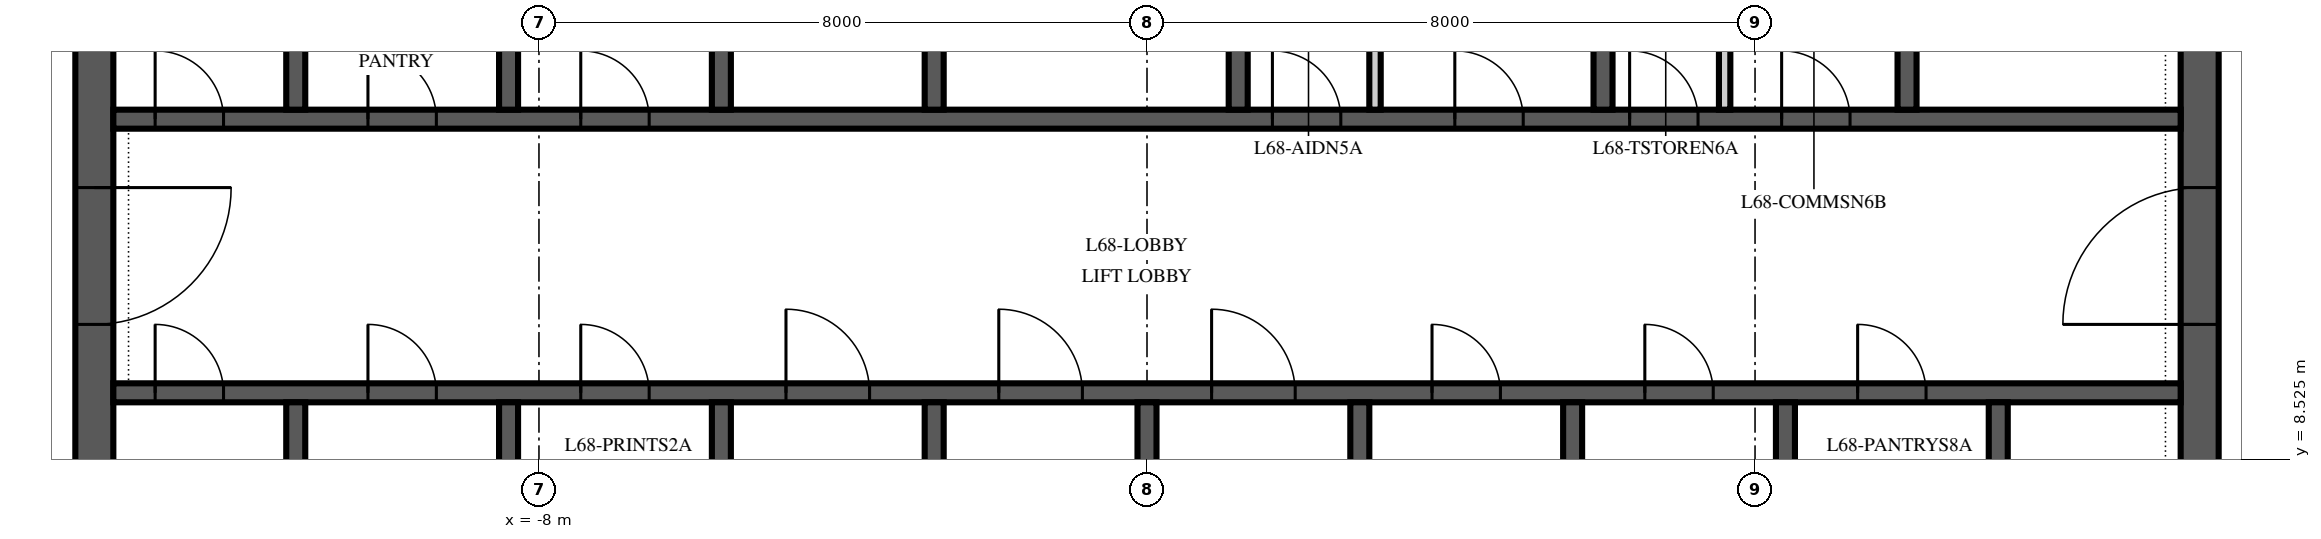
"""IFC4 building model, lengths in metres.
Left out: names, types, materials, properties, quantities, classifications, styles, units other than length and angle.
Written with IfcOpenShell. Run it as: python <this file> out.ifc"""

import sys

from ifc_helpers import new_model, si_unit, direction, frame, frame_2d, origin, place, context, subcontext, project, spatial, polyline, rectangle, outline, extrude, element, fill, save


model = new_model("IFC4")
c1 = context("Model", 3, precision=1e-05, world=origin(), true_north=direction((0.0, 1.0)))
c2 = subcontext(c1, "Body", "Model", "MODEL_VIEW")
j1 = project(units=[si_unit("LENGTHUNIT", "METRE"), si_unit("PLANEANGLEUNIT", "RADIAN")], contexts=[c1])
p1 = place(None, origin())
s1 = spatial("IfcSite", under=j1, at=p1, CompositionType="ELEMENT")
p2 = place(p1, origin())
s2 = spatial("IfcBuilding", under=s1, at=p2, CompositionType="ELEMENT")
p3 = place(p2, frame((0.0, 0.0, 292.0)))
s3 = spatial("IfcBuildingStorey", under=s2, at=p3, CompositionType="ELEMENT", Elevation=292.0)
p4 = place(p3, frame((13.85, 6.15, 0.0), z_axis=(0.0, 0.0, 1.0), x_axis=(0.0, 1.0, 0.0)))
e1 = element("IfcWall", 1, at=p4, inside=s3, PredefinedType="SHEAR", context=c2, shape_type="SweptSolid", body=[
    extrude(outline(polyline([(0.0, -0.25), (17.7, -0.25), (17.7, 0.0), (17.45, 0.0), (17.45, 0.25), (0.25, 0.25), (0.25, 0.0), (0.0, 0.0), (0.0, -0.25)])), origin(), (0.0, 0.0, 1.0), 4.0),
])
p5 = place(p4, frame((4.15, 0.0, 0.0)))
e2 = element("IfcOpeningElement", 2, at=p5, cuts=e1, PredefinedType="OPENING", context=c2, shape_type="SweptSolid", body=[
    extrude(rectangle(XDim=1.8, YDim=2.4, at=frame_2d((0.9, 1.2))), frame((0.0, 0.265, 0.0), z_axis=(0.0, -1.0, 0.0), x_axis=(1.0, 0.0, 0.0)), (0.0, 0.0, 1.0), 0.53),
])
p6 = place(p3, frame((-13.85, 23.85, 0.0), z_axis=(0.0, 0.0, 1.0), x_axis=(0.0, -1.0, 0.0)))
e3 = element("IfcWall", 3, at=p6, inside=s3, PredefinedType="SHEAR", context=c2, shape_type="SweptSolid", body=[
    extrude(outline(polyline([(0.0, -0.25), (17.7, -0.25), (17.7, 0.0), (17.45, 0.0), (17.45, 0.25), (0.25, 0.25), (0.25, 0.0), (0.0, 0.0), (0.0, -0.25)])), origin(), (0.0, 0.0, 1.0), 4.0),
])
p7 = place(p6, frame((11.75, 0.0, 0.0)))
e4 = element("IfcOpeningElement", 4, at=p7, cuts=e3, PredefinedType="OPENING", context=c2, shape_type="SweptSolid", body=[
    extrude(rectangle(XDim=1.8, YDim=2.4, at=frame_2d((0.9, 1.2))), frame((0.0, 0.265, 0.0), z_axis=(0.0, -1.0, 0.0), x_axis=(1.0, 0.0, 0.0)), (0.0, 0.0, 1.0), 0.53),
])
p8 = place(p3, frame((-13.6, 9.4, 0.0), z_axis=(0.0, 0.0, 1.0), x_axis=(1.0, 0.0, 0.0)))
e5 = element("IfcWall", 5, at=p8, inside=s3, PredefinedType="SHEAR", context=c2, shape_type="SweptSolid", body=[
    extrude(rectangle(XDim=27.2, YDim=0.25, at=frame_2d((13.6, 0.0))), origin(), (0.0, 0.0, 1.0), 4.0),
])
p9 = place(p8, frame((8.85, 0.0, 0.0)))
e6 = element("IfcOpeningElement", 6, at=p9, cuts=e5, PredefinedType="OPENING", context=c2, shape_type="SweptSolid", body=[
    extrude(rectangle(XDim=1.1, YDim=2.1, at=frame_2d((0.55, 1.05))), frame((0.0, 0.14, 0.0), z_axis=(0.0, -1.0, 0.0), x_axis=(1.0, 0.0, 0.0)), (0.0, 0.0, 1.0), 0.28),
])
p10 = place(p8, frame((11.65, 0.0, 0.0)))
e7 = element("IfcOpeningElement", 7, at=p10, cuts=e5, PredefinedType="OPENING", context=c2, shape_type="SweptSolid", body=[
    extrude(rectangle(XDim=1.1, YDim=2.1, at=frame_2d((0.55, 1.05))), frame((0.0, 0.14, 0.0), z_axis=(0.0, -1.0, 0.0), x_axis=(1.0, 0.0, 0.0)), (0.0, 0.0, 1.0), 0.28),
])
p11 = place(p8, frame((14.45, 0.0, 0.0)))
e8 = element("IfcOpeningElement", 8, at=p11, cuts=e5, PredefinedType="OPENING", context=c2, shape_type="SweptSolid", body=[
    extrude(rectangle(XDim=1.1, YDim=2.1, at=frame_2d((0.55, 1.05))), frame((0.0, 0.14, 0.0), z_axis=(0.0, -1.0, 0.0), x_axis=(1.0, 0.0, 0.0)), (0.0, 0.0, 1.0), 0.28),
])
p12 = place(p8, frame((0.55, 0.0, 0.0)))
e9 = element("IfcOpeningElement", 9, at=p12, cuts=e5, PredefinedType="OPENING", context=c2, shape_type="SweptSolid", body=[
    extrude(rectangle(XDim=0.9, YDim=2.1, at=frame_2d((0.45, 1.05))), frame((0.0, 0.14, 0.0), z_axis=(0.0, -1.0, 0.0), x_axis=(1.0, 0.0, 0.0)), (0.0, 0.0, 1.0), 0.28),
])
p13 = place(p8, frame((3.35, 0.0, 0.0)))
e10 = element("IfcOpeningElement", 10, at=p13, cuts=e5, PredefinedType="OPENING", context=c2, shape_type="SweptSolid", body=[
    extrude(rectangle(XDim=0.9, YDim=2.1, at=frame_2d((0.45, 1.05))), frame((0.0, 0.14, 0.0), z_axis=(0.0, -1.0, 0.0), x_axis=(1.0, 0.0, 0.0)), (0.0, 0.0, 1.0), 0.28),
])
p14 = place(p8, frame((6.15, 0.0, 0.0)))
e11 = element("IfcOpeningElement", 11, at=p14, cuts=e5, PredefinedType="OPENING", context=c2, shape_type="SweptSolid", body=[
    extrude(rectangle(XDim=0.9, YDim=2.1, at=frame_2d((0.45, 1.05))), frame((0.0, 0.14, 0.0), z_axis=(0.0, -1.0, 0.0), x_axis=(1.0, 0.0, 0.0)), (0.0, 0.0, 1.0), 0.28),
])
p15 = place(p8, frame((17.35, 0.0, 0.0)))
e12 = element("IfcOpeningElement", 12, at=p15, cuts=e5, PredefinedType="OPENING", context=c2, shape_type="SweptSolid", body=[
    extrude(rectangle(XDim=0.9, YDim=2.1, at=frame_2d((0.45, 1.05))), frame((0.0, 0.14, 0.0), z_axis=(0.0, -1.0, 0.0), x_axis=(1.0, 0.0, 0.0)), (0.0, 0.0, 1.0), 0.28),
])
p16 = place(p8, frame((20.15, 0.0, 0.0)))
e13 = element("IfcOpeningElement", 13, at=p16, cuts=e5, PredefinedType="OPENING", context=c2, shape_type="SweptSolid", body=[
    extrude(rectangle(XDim=0.9, YDim=2.1, at=frame_2d((0.45, 1.05))), frame((0.0, 0.14, 0.0), z_axis=(0.0, -1.0, 0.0), x_axis=(1.0, 0.0, 0.0)), (0.0, 0.0, 1.0), 0.28),
])
p17 = place(p8, frame((22.95, 0.0, 0.0)))
e14 = element("IfcOpeningElement", 14, at=p17, cuts=e5, PredefinedType="OPENING", context=c2, shape_type="SweptSolid", body=[
    extrude(rectangle(XDim=0.9, YDim=2.1, at=frame_2d((0.45, 1.05))), frame((0.0, 0.14, 0.0), z_axis=(0.0, -1.0, 0.0), x_axis=(1.0, 0.0, 0.0)), (0.0, 0.0, 1.0), 0.28),
])
p18 = place(p3, frame((-13.6, 13.0, 0.0), z_axis=(0.0, 0.0, 1.0), x_axis=(1.0, 0.0, 0.0)))
e15 = element("IfcWall", 15, at=p18, inside=s3, PredefinedType="SHEAR", context=c2, shape_type="SweptSolid", body=[
    extrude(rectangle(XDim=27.2, YDim=0.25, at=frame_2d((13.6, 0.0))), origin(), (0.0, 0.0, 1.0), 4.0),
])
p19 = place(p18, frame((15.25, 0.0, 0.0)))
e16 = element("IfcOpeningElement", 16, at=p19, cuts=e15, PredefinedType="OPENING", context=c2, shape_type="SweptSolid", body=[
    extrude(rectangle(XDim=0.9, YDim=2.1, at=frame_2d((0.45, 1.05))), frame((0.0, 0.14, 0.0), z_axis=(0.0, -1.0, 0.0), x_axis=(1.0, 0.0, 0.0)), (0.0, 0.0, 1.0), 0.28),
])
p20 = place(p18, frame((17.65, 0.0, 0.0)))
e17 = element("IfcOpeningElement", 17, at=p20, cuts=e15, PredefinedType="OPENING", context=c2, shape_type="SweptSolid", body=[
    extrude(rectangle(XDim=0.9, YDim=2.1, at=frame_2d((0.45, 1.05))), frame((0.0, 0.14, 0.0), z_axis=(0.0, -1.0, 0.0), x_axis=(1.0, 0.0, 0.0)), (0.0, 0.0, 1.0), 0.28),
])
p21 = place(p18, frame((19.95, 0.0, 0.0)))
e18 = element("IfcOpeningElement", 18, at=p21, cuts=e15, PredefinedType="OPENING", context=c2, shape_type="SweptSolid", body=[
    extrude(rectangle(XDim=0.9, YDim=2.1, at=frame_2d((0.45, 1.05))), frame((0.0, 0.14, 0.0), z_axis=(0.0, -1.0, 0.0), x_axis=(1.0, 0.0, 0.0)), (0.0, 0.0, 1.0), 0.28),
])
p22 = place(p18, frame((21.95, 0.0, 0.0)))
e19 = element("IfcOpeningElement", 19, at=p22, cuts=e15, PredefinedType="OPENING", context=c2, shape_type="SweptSolid", body=[
    extrude(rectangle(XDim=0.9, YDim=2.1, at=frame_2d((0.45, 1.05))), frame((0.0, 0.14, 0.0), z_axis=(0.0, -1.0, 0.0), x_axis=(1.0, 0.0, 0.0)), (0.0, 0.0, 1.0), 0.28),
])
p23 = place(p18, frame((0.55, 0.0, 0.0)))
e20 = element("IfcOpeningElement", 20, at=p23, cuts=e15, PredefinedType="OPENING", context=c2, shape_type="SweptSolid", body=[
    extrude(rectangle(XDim=0.9, YDim=2.1, at=frame_2d((0.45, 1.05))), frame((0.0, 0.14, 0.0), z_axis=(0.0, -1.0, 0.0), x_axis=(1.0, 0.0, 0.0)), (0.0, 0.0, 1.0), 0.28),
])
p24 = place(p18, frame((3.35, 0.0, 0.0)))
e21 = element("IfcOpeningElement", 21, at=p24, cuts=e15, PredefinedType="OPENING", context=c2, shape_type="SweptSolid", body=[
    extrude(rectangle(XDim=0.9, YDim=2.1, at=frame_2d((0.45, 1.05))), frame((0.0, 0.14, 0.0), z_axis=(0.0, -1.0, 0.0), x_axis=(1.0, 0.0, 0.0)), (0.0, 0.0, 1.0), 0.28),
])
p25 = place(p18, frame((6.15, 0.0, 0.0)))
e22 = element("IfcOpeningElement", 22, at=p25, cuts=e15, PredefinedType="OPENING", context=c2, shape_type="SweptSolid", body=[
    extrude(rectangle(XDim=0.9, YDim=2.1, at=frame_2d((0.45, 1.05))), frame((0.0, 0.14, 0.0), z_axis=(0.0, -1.0, 0.0), x_axis=(1.0, 0.0, 0.0)), (0.0, 0.0, 1.0), 0.28),
])
for number, where, z_axis, x_axis in (
    (23, (-11.2, 6.4, 0.0), (0.0, 0.0, 1.0), (0.0, 1.0, 0.0)),
    (24, (-8.4, 6.4, 0.0), (0.0, 0.0, 1.0), (0.0, 1.0, 0.0)),
    (25, (-5.6, 6.4, 0.0), (0.0, 0.0, 1.0), (0.0, 1.0, 0.0)),
    (26, (-2.8, 6.4, 0.0), (0.0, 0.0, 1.0), (0.0, 1.0, 0.0)),
    (27, (0.0, 6.4, 0.0), (0.0, 0.0, 1.0), (0.0, 1.0, 0.0)),
    (28, (2.8, 6.4, 0.0), (0.0, 0.0, 1.0), (0.0, 1.0, 0.0)),
    (29, (5.6, 6.4, 0.0), (0.0, 0.0, 1.0), (0.0, 1.0, 0.0)),
    (30, (8.4, 6.4, 0.0), (0.0, 0.0, 1.0), (0.0, 1.0, 0.0)),
    (31, (11.2, 6.4, 0.0), (0.0, 0.0, 1.0), (0.0, 1.0, 0.0)),
):
    element("IfcWall", number, at=place(p3, frame(where, z_axis=z_axis, x_axis=x_axis)), inside=s3, PredefinedType="SHEAR", context=c2, shape_type="SweptSolid", body=[
        extrude(rectangle(XDim=2.875, YDim=0.25, at=frame_2d((1.438, 0.0))), origin(), (0.0, 0.0, 1.0), 4.0),
    ])
for number, where, z_axis, x_axis in (
    (32, (-11.2, 13.125, 0.0), (0.0, 0.0, 1.0), (0.0, 1.0, 0.0)),
    (33, (-8.4, 13.125, 0.0), (0.0, 0.0, 1.0), (0.0, 1.0, 0.0)),
    (34, (-5.6, 13.125, 0.0), (0.0, 0.0, 1.0), (0.0, 1.0, 0.0)),
    (35, (-2.8, 13.125, 0.0), (0.0, 0.0, 1.0), (0.0, 1.0, 0.0)),
    (36, (1.2, 13.125, 0.0), (0.0, 0.0, 1.0), (0.0, 1.0, 0.0)),
    (37, (6.0, 13.125, 0.0), (0.0, 0.0, 1.0), (0.0, 1.0, 0.0)),
    (38, (10.0, 13.125, 0.0), (0.0, 0.0, 1.0), (0.0, 1.0, 0.0)),
):
    element("IfcWall", number, at=place(p3, frame(where, z_axis=z_axis, x_axis=x_axis)), inside=s3, PredefinedType="SHEAR", context=c2, shape_type="SweptSolid", body=[
        extrude(rectangle(XDim=2.75, YDim=0.25, at=frame_2d((1.375, 0.0))), origin(), (0.0, 0.0, 1.0), 4.0),
    ])
for number, where, z_axis, x_axis in (
    (39, (3.0, 13.125, 0.0), (0.0, 0.0, 1.0), (0.0, 1.0, 0.0)),
    (40, (7.6, 13.125, 0.0), (0.0, 0.0, 1.0), (0.0, 1.0, 0.0)),
):
    element("IfcWall", number, at=place(p3, frame(where, z_axis=z_axis, x_axis=x_axis)), inside=s3, PredefinedType="PARTITIONING", context=c2, shape_type="SweptSolid", body=[
        extrude(rectangle(XDim=2.75, YDim=0.15, at=frame_2d((1.375, 0.0))), origin(), (0.0, 0.0, 1.0), 3.85),
    ])
p26 = place(p5, origin())
e41 = element("IfcDoor", 41, at=p26, inside=s3, OperationType="DOUBLE_DOOR_SINGLE_SWING", PredefinedType="DOOR", context=c2, shape_type="SweptSolid", body=[
    extrude(rectangle(XDim=1.8, YDim=2.4, at=frame_2d((0.9, 1.2))), frame((0.0, 0.25, 0.0), z_axis=(0.0, -1.0, 0.0), x_axis=(1.0, 0.0, 0.0)), (0.0, 0.0, 1.0), 0.5),
])
fill(e2, e41)
p27 = place(p7, origin())
e42 = element("IfcDoor", 42, at=p27, inside=s3, OperationType="DOUBLE_DOOR_SINGLE_SWING", PredefinedType="DOOR", context=c2, shape_type="SweptSolid", body=[
    extrude(rectangle(XDim=1.8, YDim=2.4, at=frame_2d((0.9, 1.2))), frame((0.0, 0.25, 0.0), z_axis=(0.0, -1.0, 0.0), x_axis=(1.0, 0.0, 0.0)), (0.0, 0.0, 1.0), 0.5),
])
fill(e4, e42)
p28 = place(p9, origin())
e43 = element("IfcDoor", 43, at=p28, inside=s3, OperationType="SLIDING_TO_LEFT", PredefinedType="DOOR", context=c2, shape_type="SweptSolid", body=[
    extrude(rectangle(XDim=1.1, YDim=2.1, at=frame_2d((0.55, 1.05))), frame((0.0, 0.125, 0.0), z_axis=(0.0, -1.0, 0.0), x_axis=(1.0, 0.0, 0.0)), (0.0, 0.0, 1.0), 0.25),
])
fill(e6, e43)
p29 = place(p10, origin())
e44 = element("IfcDoor", 44, at=p29, inside=s3, OperationType="SLIDING_TO_LEFT", PredefinedType="DOOR", context=c2, shape_type="SweptSolid", body=[
    extrude(rectangle(XDim=1.1, YDim=2.1, at=frame_2d((0.55, 1.05))), frame((0.0, 0.125, 0.0), z_axis=(0.0, -1.0, 0.0), x_axis=(1.0, 0.0, 0.0)), (0.0, 0.0, 1.0), 0.25),
])
fill(e7, e44)
p30 = place(p11, origin())
e45 = element("IfcDoor", 45, at=p30, inside=s3, OperationType="SLIDING_TO_LEFT", PredefinedType="DOOR", context=c2, shape_type="SweptSolid", body=[
    extrude(rectangle(XDim=1.1, YDim=2.1, at=frame_2d((0.55, 1.05))), frame((0.0, 0.125, 0.0), z_axis=(0.0, -1.0, 0.0), x_axis=(1.0, 0.0, 0.0)), (0.0, 0.0, 1.0), 0.25),
])
fill(e8, e45)
p31 = place(p19, origin())
e46 = element("IfcDoor", 46, at=p31, inside=s3, OperationType="SINGLE_SWING_LEFT", PredefinedType="DOOR", context=c2, shape_type="SweptSolid", body=[
    extrude(rectangle(XDim=0.9, YDim=2.1, at=frame_2d((0.45, 1.05))), frame((0.0, 0.125, 0.0), z_axis=(0.0, -1.0, 0.0), x_axis=(1.0, 0.0, 0.0)), (0.0, 0.0, 1.0), 0.25),
])
fill(e16, e46)
p32 = place(p20, origin())
e47 = element("IfcDoor", 47, at=p32, inside=s3, OperationType="SINGLE_SWING_LEFT", PredefinedType="DOOR", context=c2, shape_type="SweptSolid", body=[
    extrude(rectangle(XDim=0.9, YDim=2.1, at=frame_2d((0.45, 1.05))), frame((0.0, 0.125, 0.0), z_axis=(0.0, -1.0, 0.0), x_axis=(1.0, 0.0, 0.0)), (0.0, 0.0, 1.0), 0.25),
])
fill(e17, e47)
p33 = place(p21, origin())
e48 = element("IfcDoor", 48, at=p33, inside=s3, OperationType="SINGLE_SWING_LEFT", PredefinedType="DOOR", context=c2, shape_type="SweptSolid", body=[
    extrude(rectangle(XDim=0.9, YDim=2.1, at=frame_2d((0.45, 1.05))), frame((0.0, 0.125, 0.0), z_axis=(0.0, -1.0, 0.0), x_axis=(1.0, 0.0, 0.0)), (0.0, 0.0, 1.0), 0.25),
])
fill(e18, e48)
p34 = place(p22, origin())
e49 = element("IfcDoor", 49, at=p34, inside=s3, OperationType="SINGLE_SWING_LEFT", PredefinedType="DOOR", context=c2, shape_type="SweptSolid", body=[
    extrude(rectangle(XDim=0.9, YDim=2.1, at=frame_2d((0.45, 1.05))), frame((0.0, 0.125, 0.0), z_axis=(0.0, -1.0, 0.0), x_axis=(1.0, 0.0, 0.0)), (0.0, 0.0, 1.0), 0.25),
])
fill(e19, e49)
p35 = place(p23, origin())
e50 = element("IfcDoor", 50, at=p35, inside=s3, OperationType="SINGLE_SWING_LEFT", PredefinedType="DOOR", context=c2, shape_type="SweptSolid", body=[
    extrude(rectangle(XDim=0.9, YDim=2.1, at=frame_2d((0.45, 1.05))), frame((0.0, 0.125, 0.0), z_axis=(0.0, -1.0, 0.0), x_axis=(1.0, 0.0, 0.0)), (0.0, 0.0, 1.0), 0.25),
])
fill(e20, e50)
p36 = place(p24, origin())
e51 = element("IfcDoor", 51, at=p36, inside=s3, OperationType="SINGLE_SWING_LEFT", PredefinedType="DOOR", context=c2, shape_type="SweptSolid", body=[
    extrude(rectangle(XDim=0.9, YDim=2.1, at=frame_2d((0.45, 1.05))), frame((0.0, 0.125, 0.0), z_axis=(0.0, -1.0, 0.0), x_axis=(1.0, 0.0, 0.0)), (0.0, 0.0, 1.0), 0.25),
])
fill(e21, e51)
p37 = place(p25, origin())
e52 = element("IfcDoor", 52, at=p37, inside=s3, OperationType="SINGLE_SWING_LEFT", PredefinedType="DOOR", context=c2, shape_type="SweptSolid", body=[
    extrude(rectangle(XDim=0.9, YDim=2.1, at=frame_2d((0.45, 1.05))), frame((0.0, 0.125, 0.0), z_axis=(0.0, -1.0, 0.0), x_axis=(1.0, 0.0, 0.0)), (0.0, 0.0, 1.0), 0.25),
])
fill(e22, e52)
p38 = place(p12, origin())
e53 = element("IfcDoor", 53, at=p38, inside=s3, OperationType="SINGLE_SWING_LEFT", PredefinedType="DOOR", context=c2, shape_type="SweptSolid", body=[
    extrude(rectangle(XDim=0.9, YDim=2.1, at=frame_2d((0.45, 1.05))), frame((0.0, 0.125, 0.0), z_axis=(0.0, -1.0, 0.0), x_axis=(1.0, 0.0, 0.0)), (0.0, 0.0, 1.0), 0.25),
])
fill(e9, e53)
p39 = place(p13, origin())
e54 = element("IfcDoor", 54, at=p39, inside=s3, OperationType="SINGLE_SWING_LEFT", PredefinedType="DOOR", context=c2, shape_type="SweptSolid", body=[
    extrude(rectangle(XDim=0.9, YDim=2.1, at=frame_2d((0.45, 1.05))), frame((0.0, 0.125, 0.0), z_axis=(0.0, -1.0, 0.0), x_axis=(1.0, 0.0, 0.0)), (0.0, 0.0, 1.0), 0.25),
])
fill(e10, e54)
p40 = place(p14, origin())
e55 = element("IfcDoor", 55, at=p40, inside=s3, OperationType="SINGLE_SWING_LEFT", PredefinedType="DOOR", context=c2, shape_type="SweptSolid", body=[
    extrude(rectangle(XDim=0.9, YDim=2.1, at=frame_2d((0.45, 1.05))), frame((0.0, 0.125, 0.0), z_axis=(0.0, -1.0, 0.0), x_axis=(1.0, 0.0, 0.0)), (0.0, 0.0, 1.0), 0.25),
])
fill(e11, e55)
p41 = place(p15, origin())
e56 = element("IfcDoor", 56, at=p41, inside=s3, OperationType="SINGLE_SWING_LEFT", PredefinedType="DOOR", context=c2, shape_type="SweptSolid", body=[
    extrude(rectangle(XDim=0.9, YDim=2.1, at=frame_2d((0.45, 1.05))), frame((0.0, 0.125, 0.0), z_axis=(0.0, -1.0, 0.0), x_axis=(1.0, 0.0, 0.0)), (0.0, 0.0, 1.0), 0.25),
])
fill(e12, e56)
p42 = place(p16, origin())
e57 = element("IfcDoor", 57, at=p42, inside=s3, OperationType="SINGLE_SWING_LEFT", PredefinedType="DOOR", context=c2, shape_type="SweptSolid", body=[
    extrude(rectangle(XDim=0.9, YDim=2.1, at=frame_2d((0.45, 1.05))), frame((0.0, 0.125, 0.0), z_axis=(0.0, -1.0, 0.0), x_axis=(1.0, 0.0, 0.0)), (0.0, 0.0, 1.0), 0.25),
])
fill(e13, e57)
p43 = place(p17, origin())
e58 = element("IfcDoor", 58, at=p43, inside=s3, OperationType="SINGLE_SWING_LEFT", PredefinedType="DOOR", context=c2, shape_type="SweptSolid", body=[
    extrude(rectangle(XDim=0.9, YDim=2.1, at=frame_2d((0.45, 1.05))), frame((0.0, 0.125, 0.0), z_axis=(0.0, -1.0, 0.0), x_axis=(1.0, 0.0, 0.0)), (0.0, 0.0, 1.0), 0.25),
])
fill(e14, e58)
save(model, sys.argv[1])
